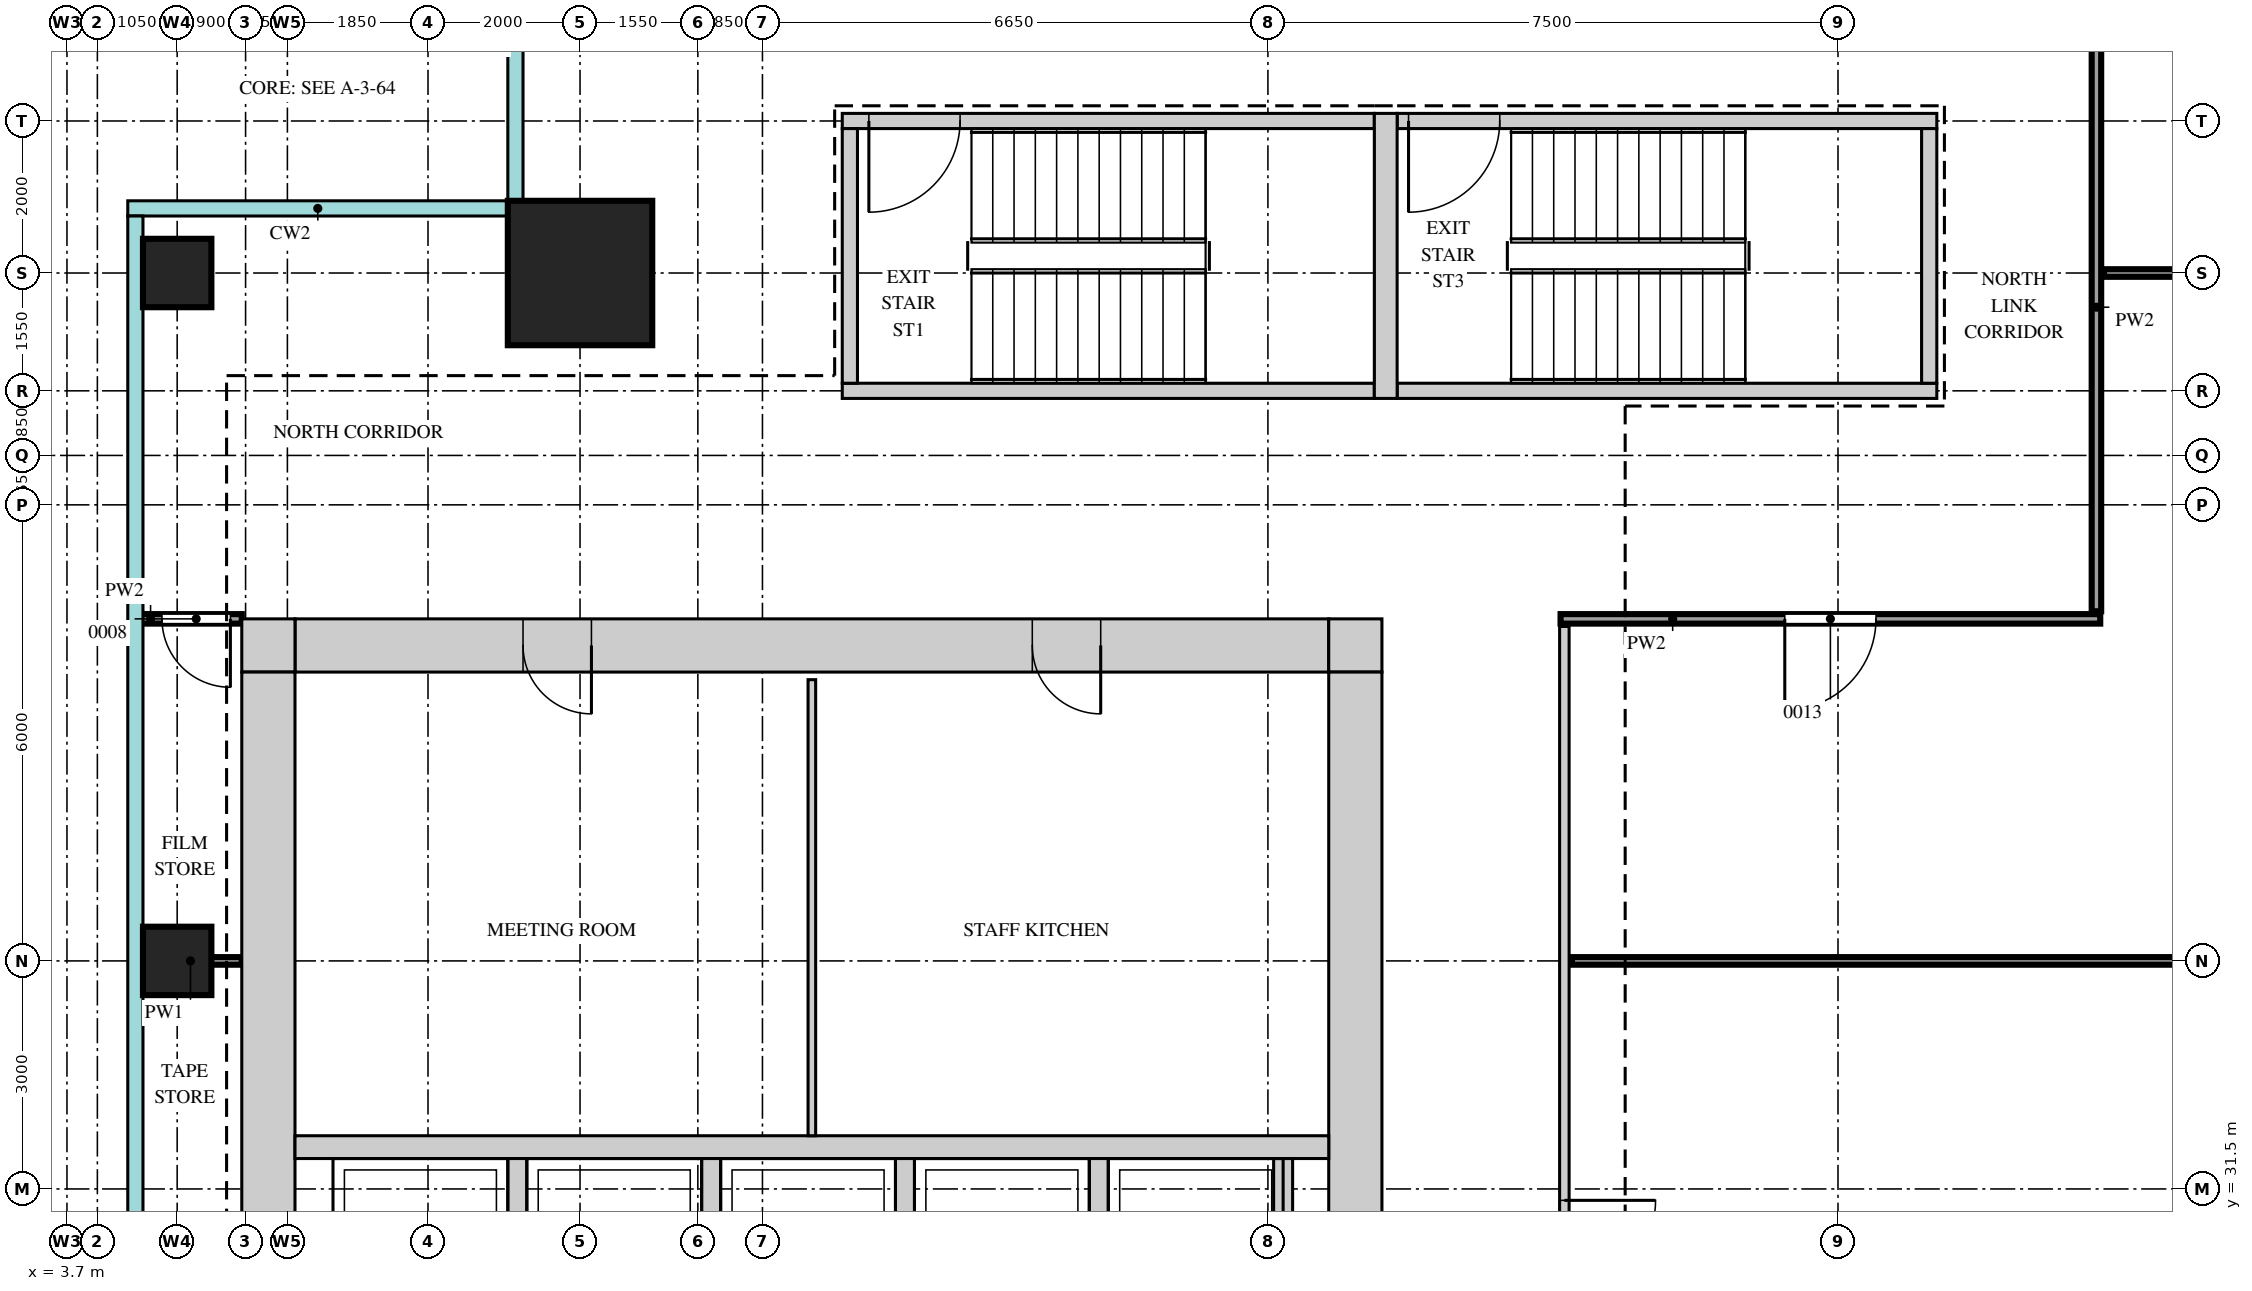
"""IFC4 building model, lengths in metres.
Left out: names, types, materials, properties, quantities, classifications, styles, units other than length and angle.
Written with IfcOpenShell. Run it as: python <this file> out.ifc"""

import sys

from ifc_helpers import new_model, si_unit, direction, frame, frame_2d, origin, origin_2d, place, context, subcontext, project, spatial, rectangle, extrude, source, transform, mapped, element, fill, save


model = new_model("IFC4")
c1 = context("Model", 3, precision=1e-05, world=origin(), true_north=direction((0.0, 1.0)))
c2 = subcontext(c1, "Body", "Model", "MODEL_VIEW")
j1 = project(units=[si_unit("LENGTHUNIT", "METRE"), si_unit("PLANEANGLEUNIT", "RADIAN")], contexts=[c1])
p1 = place(None, origin())
s1 = spatial("IfcSite", under=j1, at=p1, CompositionType="ELEMENT")
p2 = place(p1, origin())
s2 = spatial("IfcBuilding", under=s1, at=p2, CompositionType="ELEMENT")
p3 = place(p2, frame((0.0, 0.0, 250.2)))
s3 = spatial("IfcBuildingStorey", under=s2, at=p3, CompositionType="ELEMENT", Elevation=250.2)
m1 = source(origin(), c2, "Body", "SweptSolid", [
    extrude(rectangle(XDim=13.6, YDim=0.7, at=frame_2d((6.8, 0.0))), origin(), (0.0, 0.0, 1.0), 3.75),
])
p4 = place(p3, frame((6.7, 38.65, 0.0), z_axis=(0.0, 0.0, 1.0), x_axis=(1.0, 0.0, 0.0)))
e1 = element("IfcWall", 1, at=p4, inside=s3, PredefinedType="SHEAR", context=c2, shape_type="MappedRepresentation", body=[
    mapped(m1, transform((0.0, 0.0, 0.0))),
])
m2 = source(origin(), c2, "Body", "SweptSolid", [
    extrude(rectangle(XDim=0.9, YDim=2.1, at=frame_2d((0.45, 1.05))), frame((0.0, 0.36, 0.0), z_axis=(0.0, -1.0, 0.0), x_axis=(1.0, 0.0, 0.0)), (0.0, 0.0, 1.0), 0.72),
])
p5 = place(p4, frame((3.0, 0.0, 0.0)))
e2 = element("IfcOpeningElement", 2, at=p5, cuts=e1, PredefinedType="OPENING", context=c2, shape_type="MappedRepresentation", body=[
    mapped(m2, transform((0.0, 0.0, 0.0))),
])
p6 = place(p4, frame((9.7, 0.0, 0.0)))
e3 = element("IfcOpeningElement", 3, at=p6, cuts=e1, PredefinedType="OPENING", context=c2, shape_type="MappedRepresentation", body=[
    mapped(m2, transform((0.0, 0.0, 0.0))),
])
m3 = source(origin(), c2, "Body", "SweptSolid", [
    extrude(rectangle(XDim=0.7, YDim=0.7, at=frame_2d((0.35, 0.0))), origin(), (0.0, 0.0, 1.0), 3.75),
])
for number, where, z_axis, x_axis in (
    (4, (20.3, 38.65, 0.0), (0.0, 0.0, 1.0), (1.0, 0.0, 0.0)),
    (5, (6.0, 38.65, 0.0), (0.0, 0.0, 1.0), (1.0, 0.0, 0.0)),
):
    element("IfcWall", number, at=place(p3, frame(where, z_axis=z_axis, x_axis=x_axis)), inside=s3, PredefinedType="SHEAR", context=c2, shape_type="MappedRepresentation", body=[
        mapped(m3, transform((0.0, 0.0, 0.0))),
    ])
m4 = source(origin(), c2, "Body", "SweptSolid", [
    extrude(rectangle(XDim=22.6, YDim=0.7, at=frame_2d((11.3, 0.0))), origin(), (0.0, 0.0, 1.0), 3.75),
])
p7 = place(p3, frame((20.65, 15.7, 0.0), z_axis=(0.0, 0.0, 1.0), x_axis=(0.0, 1.0, 0.0)))
e6 = element("IfcWall", 6, at=p7, inside=s3, PredefinedType="SHEAR", context=c2, shape_type="MappedRepresentation", body=[
    mapped(m4, transform((0.0, 0.0, 0.0))),
])
m5 = source(origin(), c2, "Body", "SweptSolid", [
    extrude(rectangle(XDim=1.8, YDim=2.1, at=frame_2d((0.9, 1.05))), frame((0.0, 0.36, 0.0), z_axis=(0.0, -1.0, 0.0), x_axis=(1.0, 0.0, 0.0)), (0.0, 0.0, 1.0), 0.72),
])
p8 = place(p7, frame((10.8, 0.0, 0.0)))
e7 = element("IfcOpeningElement", 7, at=p8, cuts=e6, PredefinedType="OPENING", context=c2, shape_type="MappedRepresentation", body=[
    mapped(m5, transform((0.0, 0.0, 0.0))),
])
p9 = place(p7, frame((0.45, 0.0, 0.0)))
e8 = element("IfcOpeningElement", 8, at=p9, cuts=e6, PredefinedType="OPENING", context=c2, shape_type="MappedRepresentation", body=[
    mapped(m2, transform((0.0, 0.0, 0.0))),
])
p10 = place(p7, frame((2.9, 0.0, 0.0)))
e9 = element("IfcOpeningElement", 9, at=p10, cuts=e6, PredefinedType="OPENING", context=c2, shape_type="MappedRepresentation", body=[
    mapped(m2, transform((0.0, 0.0, 0.0))),
])
p11 = place(p7, frame((5.65, 0.0, 0.0)))
e10 = element("IfcOpeningElement", 10, at=p11, cuts=e6, PredefinedType="OPENING", context=c2, shape_type="MappedRepresentation", body=[
    mapped(m2, transform((0.0, 0.0, 0.0))),
])
p12 = place(p3, frame((6.35, 15.7, 0.0), z_axis=(0.0, 0.0, 1.0), x_axis=(0.0, 1.0, 0.0)))
e11 = element("IfcWall", 11, at=p12, inside=s3, PredefinedType="SHEAR", context=c2, shape_type="MappedRepresentation", body=[
    mapped(m4, transform((0.0, 0.0, 0.0))),
])
m6 = source(origin(), c2, "Body", "SweptSolid", [
    extrude(rectangle(XDim=7.0, YDim=0.2, at=frame_2d((3.5, 0.0))), origin(), (0.0, 0.0, 1.0), 3.75),
])
p13 = place(p3, frame((13.9, 45.55, 0.0), z_axis=(0.0, 0.0, 1.0), x_axis=(1.0, 0.0, 0.0)))
e12 = element("IfcWall", 12, at=p13, inside=s3, PredefinedType="SHEAR", context=c2, shape_type="MappedRepresentation", body=[
    mapped(m6, transform((0.0, 0.0, 0.0))),
])
m7 = source(origin(), c2, "Body", "SweptSolid", [
    extrude(rectangle(XDim=1.2, YDim=2.1, at=frame_2d((0.6, 1.05))), frame((0.0, 0.11, 0.0), z_axis=(0.0, -1.0, 0.0), x_axis=(1.0, 0.0, 0.0)), (0.0, 0.0, 1.0), 0.22),
])
p14 = place(p13, frame((0.35, 0.0, 0.0)))
e13 = element("IfcOpeningElement", 13, at=p14, cuts=e12, PredefinedType="OPENING", context=c2, shape_type="MappedRepresentation", body=[
    mapped(m7, transform((0.0, 0.0, 0.0))),
])
p15 = place(p3, frame((13.9, 42.0, 0.0), z_axis=(0.0, 0.0, 1.0), x_axis=(1.0, 0.0, 0.0)))
e14 = element("IfcWall", 14, at=p15, inside=s3, PredefinedType="SHEAR", context=c2, shape_type="MappedRepresentation", body=[
    mapped(m6, transform((0.0, 0.0, 0.0))),
])
m8 = source(origin(), c2, "Body", "SweptSolid", [
    extrude(rectangle(XDim=7.1, YDim=0.2, at=frame_2d((3.55, 0.0))), origin(), (0.0, 0.0, 1.0), 3.75),
])
p16 = place(p3, frame((21.2, 45.55, 0.0), z_axis=(0.0, 0.0, 1.0), x_axis=(1.0, 0.0, 0.0)))
e15 = element("IfcWall", 15, at=p16, inside=s3, PredefinedType="SHEAR", context=c2, shape_type="MappedRepresentation", body=[
    mapped(m8, transform((0.0, 0.0, 0.0))),
])
p17 = place(p16, frame((0.15, 0.0, 0.0)))
e16 = element("IfcOpeningElement", 16, at=p17, cuts=e15, PredefinedType="OPENING", context=c2, shape_type="MappedRepresentation", body=[
    mapped(m7, transform((0.0, 0.0, 0.0))),
])
p18 = place(p3, frame((21.2, 42.0, 0.0), z_axis=(0.0, 0.0, 1.0), x_axis=(1.0, 0.0, 0.0)))
e17 = element("IfcWall", 17, at=p18, inside=s3, PredefinedType="SHEAR", context=c2, shape_type="MappedRepresentation", body=[
    mapped(m8, transform((0.0, 0.0, 0.0))),
])
m9 = source(origin(), c2, "Body", "SweptSolid", [
    extrude(rectangle(XDim=3.75, YDim=0.3, at=frame_2d((1.875, 0.0))), origin(), (0.0, 0.0, 1.0), 3.75),
])
p19 = place(p3, frame((21.05, 41.9, 0.0), z_axis=(0.0, 0.0, 1.0), x_axis=(0.0, 1.0, 0.0)))
e18 = element("IfcWall", 18, at=p19, inside=s3, PredefinedType="SHEAR", context=c2, shape_type="MappedRepresentation", body=[
    mapped(m9, transform((0.0, 0.0, 0.0))),
])
m10 = source(origin(), c2, "Body", "SweptSolid", [
    extrude(rectangle(XDim=3.35, YDim=0.2, at=frame_2d((1.675, 0.0))), origin(), (0.0, 0.0, 1.0), 3.75),
])
for number, where, z_axis, x_axis in (
    (19, (14.0, 42.1, 0.0), (0.0, 0.0, 1.0), (0.0, 1.0, 0.0)),
    (20, (28.2, 42.1, 0.0), (0.0, 0.0, 1.0), (0.0, 1.0, 0.0)),
):
    element("IfcWall", number, at=place(p3, frame(where, z_axis=z_axis, x_axis=x_axis)), inside=s3, PredefinedType="SHEAR", context=c2, shape_type="MappedRepresentation", body=[
        mapped(m10, transform((0.0, 0.0, 0.0))),
    ])
m11 = source(origin(), c2, "Body", "SweptSolid", [
    extrude(rectangle(XDim=13.6, YDim=0.3, at=frame_2d((6.8, 0.0))), origin(), (0.0, 0.0, 1.0), 3.75),
])
p20 = place(p3, frame((6.7, 32.05, 0.0), z_axis=(0.0, 0.0, 1.0), x_axis=(1.0, 0.0, 0.0)))
e21 = element("IfcWall", 21, at=p20, inside=s3, PredefinedType="STANDARD", context=c2, shape_type="MappedRepresentation", body=[
    mapped(m11, transform((0.0, 0.0, 0.0))),
])
m12 = source(origin(), c2, "Body", "SweptSolid", [
    extrude(rectangle(XDim=2.4, YDim=0.25, at=frame_2d((1.2, 0.0))), origin(), (0.0, 0.0, 1.0), 3.75),
])
for number, where, z_axis, x_axis in (
    (22, (17.275, 29.5, 0.0), (0.0, 0.0, 1.0), (0.0, 1.0, 0.0)),
    (23, (19.7, 29.5, 0.0), (0.0, 0.0, 1.0), (0.0, 1.0, 0.0)),
    (24, (9.625, 29.5, 0.0), (0.0, 0.0, 1.0), (0.0, 1.0, 0.0)),
    (25, (12.175, 29.5, 0.0), (0.0, 0.0, 1.0), (0.0, 1.0, 0.0)),
    (26, (14.725, 29.5, 0.0), (0.0, 0.0, 1.0), (0.0, 1.0, 0.0)),
):
    element("IfcWall", number, at=place(p3, frame(where, z_axis=z_axis, x_axis=x_axis)), inside=s3, PredefinedType="STANDARD", context=c2, shape_type="MappedRepresentation", body=[
        mapped(m12, transform((0.0, 0.0, 0.0))),
    ])
m13 = source(origin(), c2, "Body", "SweptSolid", [
    extrude(rectangle(XDim=1.9, YDim=1.9, at=origin_2d()), origin(), (0.0, 0.0, 1.0), 4.0),
])
p21 = place(p3, frame((10.45, 43.55, 0.0), z_axis=(0.0, 0.0, 1.0), x_axis=(1.0, 0.0, 0.0)))
e27 = element("IfcColumn", 27, at=p21, inside=s3, PredefinedType="COLUMN", context=c2, shape_type="MappedRepresentation", body=[
    mapped(m13, transform((0.0, 0.0, 0.0))),
])
m14 = source(origin(), c2, "Body", "SweptSolid", [
    extrude(rectangle(XDim=0.9, YDim=0.9, at=origin_2d()), origin(), (0.0, 0.0, 1.0), 3.75),
])
for number, where, z_axis, x_axis in (
    (28, (5.15, 34.5, 0.0), (0.0, 0.0, 1.0), (1.0, 0.0, 0.0)),
    (29, (5.15, 43.55, 0.0), (0.0, 0.0, 1.0), (1.0, 0.0, 0.0)),
):
    element("IfcColumn", number, at=place(p3, frame(where, z_axis=z_axis, x_axis=x_axis)), inside=s3, PredefinedType="COLUMN", context=c2, shape_type="MappedRepresentation", body=[
        mapped(m14, transform((0.0, 0.0, 0.0))),
    ])
m15 = source(origin(), c2, "Body", "SweptSolid", [
    extrude(rectangle(XDim=20.8, YDim=0.125, at=frame_2d((10.4, 0.0))), origin(), (0.0, 0.0, 1.0), 3.8),
])
p22 = place(p3, frame((23.4, 18.1, 0.0), z_axis=(0.0, 0.0, 1.0), x_axis=(0.0, 1.0, 0.0)))
e30 = element("IfcWall", 30, at=p22, inside=s3, PredefinedType="PARTITIONING", context=c2, shape_type="MappedRepresentation", body=[
    mapped(m15, transform((0.0, 0.0, 0.0))),
])
m16 = source(origin(), c2, "Body", "SweptSolid", [
    extrude(rectangle(XDim=1.2, YDim=2.1, at=frame_2d((0.6, 1.05))), frame((0.0, 0.073, 0.0), z_axis=(0.0, -1.0, 0.0), x_axis=(1.0, 0.0, 0.0)), (0.0, 0.0, 1.0), 0.145),
])
p23 = place(p22, frame((12.05, 0.0, 0.0)))
e31 = element("IfcOpeningElement", 31, at=p23, cuts=e30, PredefinedType="OPENING", context=c2, shape_type="MappedRepresentation", body=[
    mapped(m16, transform((0.0, 0.0, 0.0))),
])
m17 = source(origin(), c2, "Body", "SweptSolid", [
    extrude(rectangle(XDim=6.0, YDim=0.1, at=frame_2d((3.0, 0.0))), origin(), (0.0, 0.0, 1.0), 3.8),
])
p24 = place(p3, frame((13.5, 32.2, 0.0), z_axis=(0.0, 0.0, 1.0), x_axis=(0.0, 1.0, 0.0)))
e32 = element("IfcWall", 32, at=p24, inside=s3, PredefinedType="PARTITIONING", context=c2, shape_type="MappedRepresentation", body=[
    mapped(m17, transform((0.0, 0.0, 0.0))),
])
m18 = source(origin(), c2, "Body", "SweptSolid", [
    extrude(rectangle(XDim=1.35, YDim=0.1, at=frame_2d((0.675, 0.0))), origin(), (0.0, 0.0, 1.0), 3.8),
])
p25 = place(p3, frame((4.65, 34.5, 0.0), z_axis=(0.0, 0.0, 1.0), x_axis=(1.0, 0.0, 0.0)))
e33 = element("IfcWall", 33, at=p25, inside=s3, PredefinedType="PARTITIONING", context=c2, shape_type="MappedRepresentation", body=[
    mapped(m18, transform((0.0, 0.0, 0.0))),
])
m19 = source(origin(), c2, "Body", "SweptSolid", [
    extrude(rectangle(XDim=25.85, YDim=0.1, at=frame_2d((12.925, 0.0))), origin(), (0.0, 0.0, 1.0), 3.8),
])
p26 = place(p3, frame((23.5, 34.5, 0.0), z_axis=(0.0, 0.0, 1.0), x_axis=(1.0, 0.0, 0.0)))
e34 = element("IfcWall", 34, at=p26, inside=s3, PredefinedType="PARTITIONING", context=c2, shape_type="MappedRepresentation", body=[
    mapped(m19, transform((0.0, 0.0, 0.0))),
])
m20 = source(origin(), c2, "Body", "SweptSolid", [
    extrude(rectangle(XDim=1.35, YDim=0.125, at=frame_2d((0.675, 0.0))), origin(), (0.0, 0.0, 1.0), 3.8),
])
p27 = place(p3, frame((4.65, 39.0, 0.0), z_axis=(0.0, 0.0, 1.0), x_axis=(1.0, 0.0, 0.0)))
e35 = element("IfcWall", 35, at=p27, inside=s3, PredefinedType="PARTITIONING", context=c2, shape_type="MappedRepresentation", body=[
    mapped(m20, transform((0.0, 0.0, 0.0))),
])
m21 = source(origin(), c2, "Body", "SweptSolid", [
    extrude(rectangle(XDim=0.9, YDim=2.1, at=frame_2d((0.45, 1.05))), frame((0.0, 0.073, 0.0), z_axis=(0.0, -1.0, 0.0), x_axis=(1.0, 0.0, 0.0)), (0.0, 0.0, 1.0), 0.145),
])
p28 = place(p27, frame((0.3, 0.0, 0.0)))
e36 = element("IfcOpeningElement", 36, at=p28, cuts=e35, PredefinedType="OPENING", context=c2, shape_type="MappedRepresentation", body=[
    mapped(m21, transform((0.0, 0.0, 0.0))),
])
m22 = source(origin(), c2, "Body", "SweptSolid", [
    extrude(rectangle(XDim=7.1, YDim=0.125, at=frame_2d((3.55, 0.0))), origin(), (0.0, 0.0, 1.0), 3.8),
])
p29 = place(p3, frame((23.35, 39.0, 0.0), z_axis=(0.0, 0.0, 1.0), x_axis=(1.0, 0.0, 0.0)))
e37 = element("IfcWall", 37, at=p29, inside=s3, PredefinedType="PARTITIONING", context=c2, shape_type="MappedRepresentation", body=[
    mapped(m22, transform((0.0, 0.0, 0.0))),
])
p30 = place(p29, frame((2.95, 0.0, 0.0)))
e38 = element("IfcOpeningElement", 38, at=p30, cuts=e37, PredefinedType="OPENING", context=c2, shape_type="MappedRepresentation", body=[
    mapped(m16, transform((0.0, 0.0, 0.0))),
])
m23 = source(origin(), c2, "Body", "SweptSolid", [
    extrude(rectangle(XDim=10.25, YDim=0.125, at=frame_2d((5.125, 0.0))), origin(), (0.0, 0.0, 1.0), 3.8),
])
p31 = place(p3, frame((30.4, 39.1, 0.0), z_axis=(0.0, 0.0, 1.0), x_axis=(0.0, 1.0, 0.0)))
e39 = element("IfcWall", 39, at=p31, inside=s3, PredefinedType="PARTITIONING", context=c2, shape_type="MappedRepresentation", body=[
    mapped(m23, transform((0.0, 0.0, 0.0))),
])
p32 = place(p31, frame((8.0, 0.0, 0.0)))
e40 = element("IfcOpeningElement", 40, at=p32, cuts=e39, PredefinedType="OPENING", context=c2, shape_type="MappedRepresentation", body=[
    mapped(m21, transform((0.0, 0.0, 0.0))),
])
m24 = source(origin(), c2, "Body", "SweptSolid", [
    extrude(rectangle(XDim=18.85, YDim=0.1, at=frame_2d((9.425, 0.0))), origin(), (0.0, 0.0, 1.0), 3.3),
])
p33 = place(p3, frame((30.5, 43.55, 0.0), z_axis=(0.0, 0.0, 1.0), x_axis=(1.0, 0.0, 0.0)))
e41 = element("IfcWall", 41, at=p33, inside=s3, PredefinedType="PARTITIONING", context=c2, shape_type="MappedRepresentation", body=[
    mapped(m24, transform((0.0, 0.0, 0.0))),
])
m25 = source(origin(), c2, "Body", "SweptSolid", [
    extrude(rectangle(XDim=0.9, YDim=2.1, at=frame_2d((0.45, 1.05))), frame((0.0, 0.3, 0.0), z_axis=(0.0, -1.0, 0.0), x_axis=(1.0, 0.0, 0.0)), (0.0, 0.0, 1.0), 0.6),
])
p34 = place(p5, origin())
e42 = element("IfcDoor", 42, at=p34, inside=s3, OperationType="SINGLE_SWING_RIGHT", PredefinedType="DOOR", context=c2, shape_type="MappedRepresentation", body=[
    mapped(m25, transform((0.0, 0.0, 0.0))),
])
fill(e2, e42)
p35 = place(p6, origin())
e43 = element("IfcDoor", 43, at=p35, inside=s3, OperationType="SINGLE_SWING_RIGHT", PredefinedType="DOOR", context=c2, shape_type="MappedRepresentation", body=[
    mapped(m25, transform((0.0, 0.0, 0.0))),
])
fill(e3, e43)
m26 = source(origin(), c2, "Body", "SweptSolid", [
    extrude(rectangle(XDim=0.9, YDim=2.1, at=frame_2d((0.45, 1.05))), frame((0.0, 0.025, 0.0), z_axis=(0.0, -1.0, 0.0), x_axis=(1.0, 0.0, 0.0)), (0.0, 0.0, 1.0), 0.05),
])
p36 = place(p28, origin())
e44 = element("IfcDoor", 44, at=p36, inside=s3, OperationType="SINGLE_SWING_RIGHT", PredefinedType="DOOR", context=c2, shape_type="MappedRepresentation", body=[
    mapped(m26, transform((0.0, 0.0, 0.0))),
])
fill(e36, e44)
m27 = source(origin(), c2, "Body", "SweptSolid", [
    extrude(rectangle(XDim=1.2, YDim=2.1, at=frame_2d((0.6, 1.05))), frame((0.0, 0.025, 0.0), z_axis=(0.0, -1.0, 0.0), x_axis=(1.0, 0.0, 0.0)), (0.0, 0.0, 1.0), 0.05),
])
p37 = place(p23, origin())
e45 = element("IfcDoor", 45, at=p37, inside=s3, OperationType="SINGLE_SWING_RIGHT", PredefinedType="DOOR", context=c2, shape_type="MappedRepresentation", body=[
    mapped(m27, transform((0.0, 0.0, 0.0))),
])
fill(e31, e45)
p38 = place(p30, origin())
e46 = element("IfcDoor", 46, at=p38, inside=s3, OperationType="SINGLE_SWING_LEFT", PredefinedType="DOOR", context=c2, shape_type="MappedRepresentation", body=[
    mapped(m27, transform((0.0, 0.0, 0.0))),
])
fill(e38, e46)
p39 = place(p14, origin())
e47 = element("IfcDoor", 47, at=p39, inside=s3, OperationType="SINGLE_SWING_LEFT", PredefinedType="DOOR", context=c2, shape_type="MappedRepresentation", body=[
    mapped(m27, transform((0.0, 0.0, 0.0))),
])
fill(e13, e47)
p40 = place(p17, origin())
e48 = element("IfcDoor", 48, at=p40, inside=s3, OperationType="SINGLE_SWING_LEFT", PredefinedType="DOOR", context=c2, shape_type="MappedRepresentation", body=[
    mapped(m27, transform((0.0, 0.0, 0.0))),
])
fill(e16, e48)
save(model, sys.argv[1])
